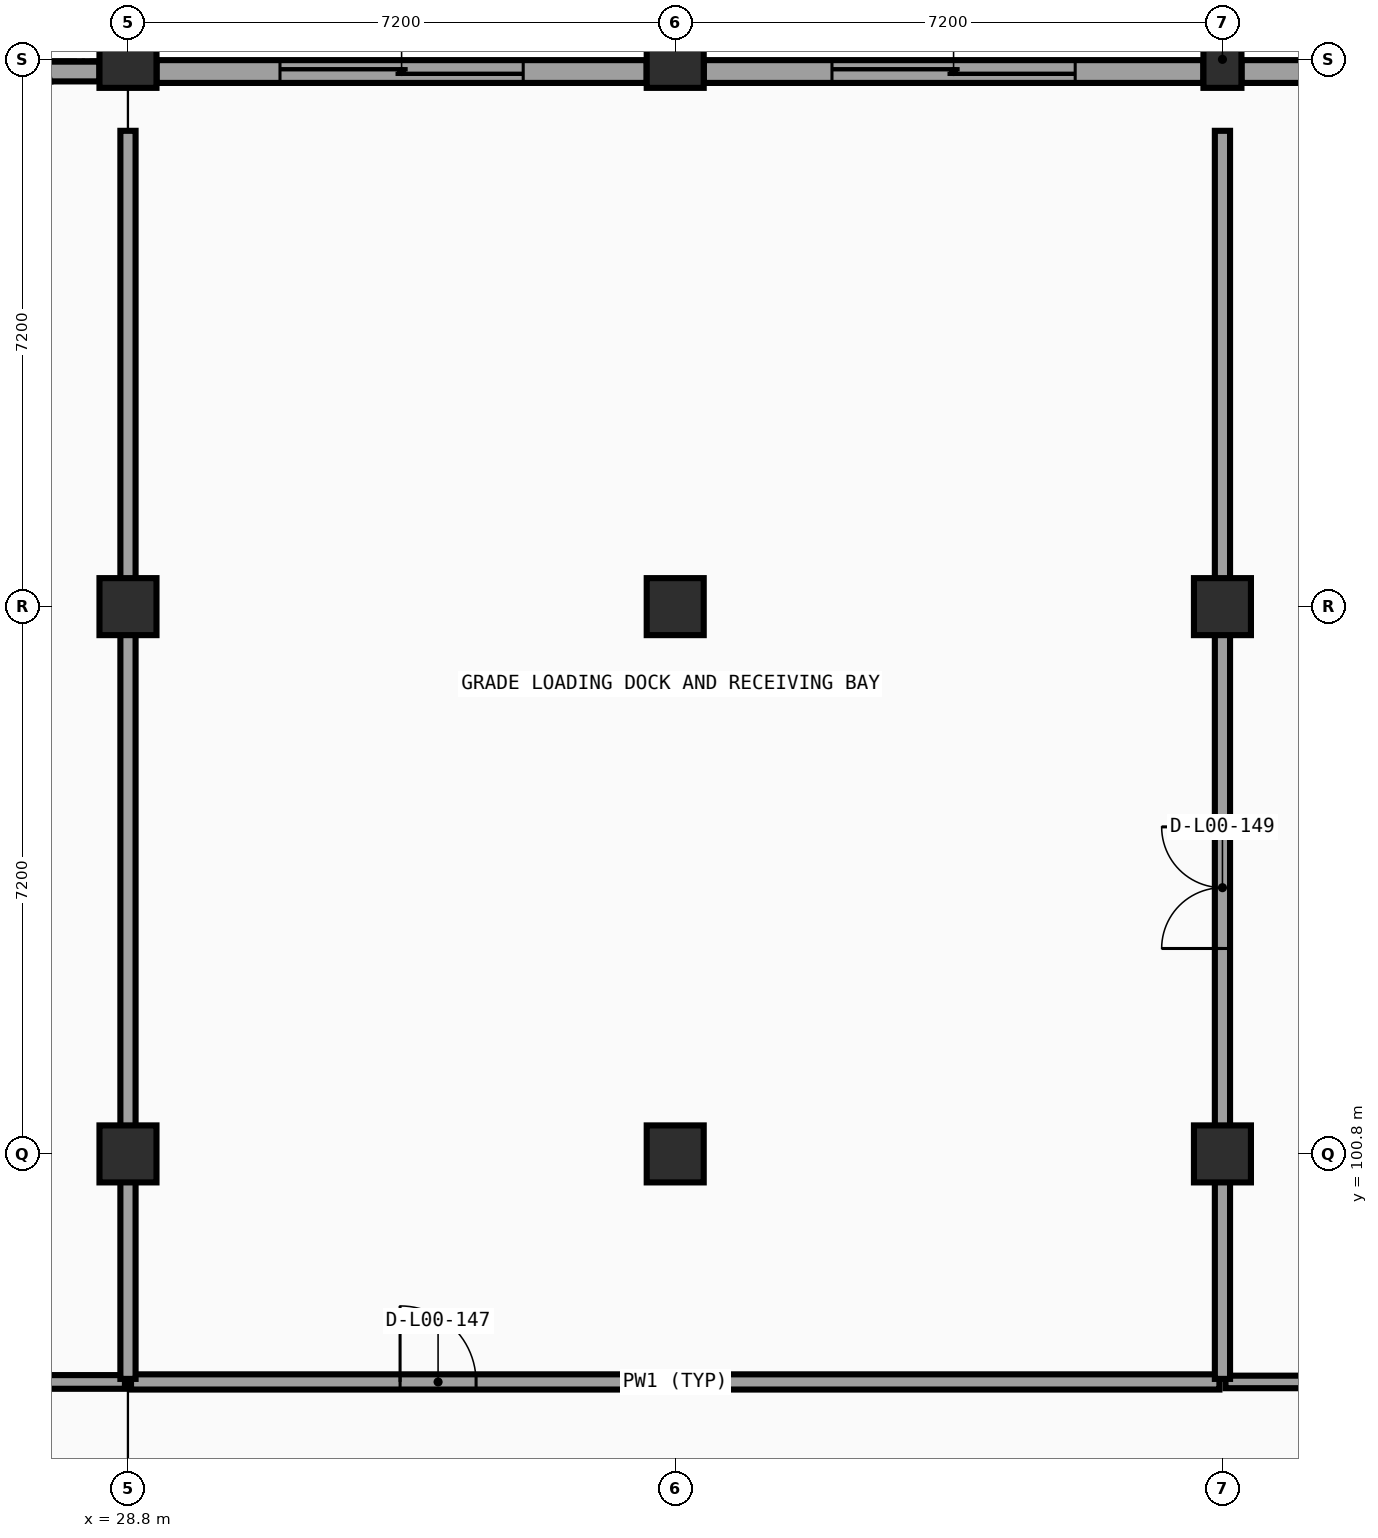
"""IFC4 building model, lengths in metres.
Left out: names, types, materials, properties, quantities, classifications, styles, units other than length and angle.
Written with IfcOpenShell. Run it as: python <this file> out.ifc"""

import sys

from ifc_helpers import new_model, si_unit, direction, frame, frame_2d, origin, origin_2d, place, context, subcontext, project, spatial, rectangle, extrude, element, fill, save


model = new_model("IFC4")
c1 = context("Model", 3, precision=1e-05, world=origin(), true_north=direction((0.0, 1.0)))
c2 = subcontext(c1, "Body", "Model", "MODEL_VIEW")
j1 = project(units=[si_unit("LENGTHUNIT", "METRE"), si_unit("PLANEANGLEUNIT", "RADIAN")], contexts=[c1])
p1 = place(None, origin())
s1 = spatial("IfcSite", under=j1, at=p1, CompositionType="ELEMENT")
p2 = place(p1, origin())
s2 = spatial("IfcBuilding", under=s1, at=p2, CompositionType="ELEMENT")
p3 = place(p2, origin())
s3 = spatial("IfcBuildingStorey", under=s2, at=p3, CompositionType="ELEMENT", Elevation=0.0)
for number, where, z_axis, x_axis in (
    (1, (28.8, 100.8, 0.0), (0.0, 0.0, 1.0), (1.0, 0.0, 0.0)),
    (2, (28.8, 108.0, 0.0), (0.0, 0.0, 1.0), (1.0, 0.0, 0.0)),
    (3, (28.8, 115.2, 0.0), (0.0, 0.0, 1.0), (1.0, 0.0, 0.0)),
    (4, (36.0, 100.8, 0.0), (0.0, 0.0, 1.0), (1.0, 0.0, 0.0)),
    (5, (36.0, 108.0, 0.0), (0.0, 0.0, 1.0), (1.0, 0.0, 0.0)),
    (6, (36.0, 115.2, 0.0), (0.0, 0.0, 1.0), (1.0, 0.0, 0.0)),
    (7, (43.2, 100.8, 0.0), (0.0, 0.0, 1.0), (1.0, 0.0, 0.0)),
    (8, (43.2, 108.0, 0.0), (0.0, 0.0, 1.0), (1.0, 0.0, 0.0)),
):
    element("IfcColumn", number, at=place(p3, frame(where, z_axis=z_axis, x_axis=x_axis)), inside=s3, PredefinedType="COLUMN", context=c2, shape_type="SweptSolid", body=[
        extrude(rectangle(XDim=0.75, YDim=0.75, at=origin_2d()), origin(), (0.0, 0.0, 1.0), 5.4),
    ])
p4 = place(p3, frame((43.2, 115.2, 0.0), z_axis=(0.0, 0.0, 1.0), x_axis=(1.0, 0.0, 0.0)))
e9 = element("IfcColumn", 9, at=p4, inside=s3, PredefinedType="PILASTER", context=c2, shape_type="SweptSolid", body=[
    extrude(rectangle(XDim=0.5, YDim=0.75, at=origin_2d()), origin(), (0.0, 0.0, 1.0), 5.4),
])
p5 = place(p3, frame((27.744, 115.04, 0.0), z_axis=(0.0, 0.0, 1.0), x_axis=(1.0, 0.0, 0.0)))
e10 = element("IfcWall", 10, at=p5, inside=s3, PredefinedType="SOLIDWALL", context=c2, shape_type="SweptSolid", body=[
    extrude(rectangle(XDim=0.68, YDim=0.26, at=frame_2d((0.34, 0.0))), origin(), (0.0, 0.0, 1.0), 4.411),
])
p6 = place(p3, frame((29.176, 115.04, 0.0), z_axis=(0.0, 0.0, 1.0), x_axis=(1.0, 0.0, 0.0)))
e11 = element("IfcWall", 11, at=p6, inside=s3, PredefinedType="SOLIDWALL", context=c2, shape_type="SweptSolid", body=[
    extrude(rectangle(XDim=6.448, YDim=0.3, at=frame_2d((3.224, 0.0))), origin(), (0.0, 0.0, 1.0), 4.411),
])
p7 = place(p6, frame((1.624, 0.0, 0.0)))
e12 = element("IfcOpeningElement", 12, at=p7, cuts=e11, PredefinedType="OPENING", context=c2, shape_type="SweptSolid", body=[
    extrude(rectangle(XDim=3.2, YDim=3.5, at=frame_2d((1.6, 1.75))), frame((0.0, 0.16, 0.0), z_axis=(0.0, -1.0, 0.0), x_axis=(1.0, 0.0, 0.0)), (0.0, 0.0, 1.0), 0.32),
])
p8 = place(p3, frame((36.376, 115.04, 0.0), z_axis=(0.0, 0.0, 1.0), x_axis=(1.0, 0.0, 0.0)))
e13 = element("IfcWall", 13, at=p8, inside=s3, PredefinedType="SOLIDWALL", context=c2, shape_type="SweptSolid", body=[
    extrude(rectangle(XDim=6.573, YDim=0.3, at=frame_2d((3.287, 0.0))), origin(), (0.0, 0.0, 1.0), 4.311),
])
p9 = place(p8, frame((1.687, 0.0, 0.0)))
e14 = element("IfcOpeningElement", 14, at=p9, cuts=e13, PredefinedType="OPENING", context=c2, shape_type="SweptSolid", body=[
    extrude(rectangle(XDim=3.2, YDim=3.5, at=frame_2d((1.6, 1.75))), frame((0.0, 0.16, 0.0), z_axis=(0.0, -1.0, 0.0), x_axis=(1.0, 0.0, 0.0)), (0.0, 0.0, 1.0), 0.32),
])
p10 = place(p3, frame((43.451, 115.04, 0.0), z_axis=(0.0, 0.0, 1.0), x_axis=(1.0, 0.0, 0.0)))
e15 = element("IfcWall", 15, at=p10, inside=s3, PredefinedType="SOLIDWALL", context=c2, shape_type="SweptSolid", body=[
    extrude(rectangle(XDim=6.573, YDim=0.3, at=frame_2d((3.287, 0.0))), origin(), (0.0, 0.0, 1.0), 4.311),
])
p11 = place(p10, frame((2.362, 0.0, 0.85)))
e16 = element("IfcOpeningElement", 16, at=p11, cuts=e15, PredefinedType="OPENING", context=c2, shape_type="SweptSolid", body=[
    extrude(rectangle(XDim=1.85, YDim=2.1, at=frame_2d((0.925, 1.05))), frame((0.0, 0.16, 0.0), z_axis=(0.0, -1.0, 0.0), x_axis=(1.0, 0.0, 0.0)), (0.0, 0.0, 1.0), 0.32),
])
p12 = place(p3, frame((4.64, 97.8, 0.0), z_axis=(0.0, 0.0, 1.0), x_axis=(1.0, 0.0, 0.0)))
e17 = element("IfcWall", 17, at=p12, inside=s3, PredefinedType="PARTITIONING", context=c2, shape_type="SweptSolid", body=[
    extrude(rectangle(XDim=24.12, YDim=0.18, at=frame_2d((12.06, 0.0))), origin(), (0.0, 0.0, 1.0), 4.311),
])
p13 = place(p12, frame((19.915, 0.0, 0.0)))
e18 = element("IfcOpeningElement", 18, at=p13, cuts=e17, PredefinedType="OPENING", context=c2, shape_type="SweptSolid", body=[
    extrude(rectangle(XDim=1.0, YDim=2.1, at=frame_2d((0.5, 1.05))), frame((0.0, 0.1, 0.0), z_axis=(0.0, -1.0, 0.0), x_axis=(1.0, 0.0, 0.0)), (0.0, 0.0, 1.0), 0.2),
])
p14 = place(p3, frame((28.84, 97.8, 0.0), z_axis=(0.0, 0.0, 1.0), x_axis=(1.0, 0.0, 0.0)))
e19 = element("IfcWall", 19, at=p14, inside=s3, PredefinedType="PARTITIONING", context=c2, shape_type="SweptSolid", body=[
    extrude(rectangle(XDim=14.32, YDim=0.2, at=frame_2d((7.16, 0.0))), origin(), (0.0, 0.0, 1.0), 4.311),
])
p15 = place(p14, frame((3.54, 0.0, 0.0)))
e20 = element("IfcOpeningElement", 20, at=p15, cuts=e19, PredefinedType="OPENING", context=c2, shape_type="SweptSolid", body=[
    extrude(rectangle(XDim=1.0, YDim=2.1, at=frame_2d((0.5, 1.05))), frame((0.0, 0.11, 0.0), z_axis=(0.0, -1.0, 0.0), x_axis=(1.0, 0.0, 0.0)), (0.0, 0.0, 1.0), 0.22),
])
p16 = place(p3, frame((43.24, 97.8, 0.0), z_axis=(0.0, 0.0, 1.0), x_axis=(1.0, 0.0, 0.0)))
e21 = element("IfcWall", 21, at=p16, inside=s3, PredefinedType="PARTITIONING", context=c2, shape_type="SweptSolid", body=[
    extrude(rectangle(XDim=21.12, YDim=0.165, at=frame_2d((10.56, 0.0))), origin(), (0.0, 0.0, 1.0), 4.311),
])
p17 = place(p16, frame((2.755, 0.0, 0.0)))
e22 = element("IfcOpeningElement", 22, at=p17, cuts=e21, PredefinedType="OPENING", context=c2, shape_type="SweptSolid", body=[
    extrude(rectangle(XDim=1.6, YDim=2.1, at=frame_2d((0.8, 1.05))), frame((0.0, 0.093, 0.0), z_axis=(0.0, -1.0, 0.0), x_axis=(1.0, 0.0, 0.0)), (0.0, 0.0, 1.0), 0.185),
])
p18 = place(p3, frame((28.8, 97.84, 0.0), z_axis=(0.0, 0.0, 1.0), x_axis=(0.0, 1.0, 0.0)))
e23 = element("IfcWall", 23, at=p18, inside=s3, PredefinedType="PARTITIONING", context=c2, shape_type="SweptSolid", body=[
    extrude(rectangle(XDim=16.42, YDim=0.2, at=frame_2d((8.21, 0.0))), origin(), (0.0, 0.0, 1.0), 4.311),
])
p19 = place(p3, frame((43.2, 97.84, 0.0), z_axis=(0.0, 0.0, 1.0), x_axis=(0.0, 1.0, 0.0)))
e24 = element("IfcWall", 24, at=p19, inside=s3, PredefinedType="PARTITIONING", context=c2, shape_type="SweptSolid", body=[
    extrude(rectangle(XDim=16.42, YDim=0.2, at=frame_2d((8.21, 0.0))), origin(), (0.0, 0.0, 1.0), 4.311),
])
p20 = place(p19, frame((5.663, 0.0, 0.0)))
e25 = element("IfcOpeningElement", 25, at=p20, cuts=e24, PredefinedType="OPENING", context=c2, shape_type="SweptSolid", body=[
    extrude(rectangle(XDim=1.6, YDim=2.1, at=frame_2d((0.8, 1.05))), frame((0.0, 0.11, 0.0), z_axis=(0.0, -1.0, 0.0), x_axis=(1.0, 0.0, 0.0)), (0.0, 0.0, 1.0), 0.22),
])
p21 = place(p7, origin())
e26 = element("IfcDoor", 26, at=p21, inside=s3, OperationType="ROLLINGUP", PredefinedType="DOOR", context=c2, shape_type="SweptSolid", body=[
    extrude(rectangle(XDim=3.2, YDim=3.5, at=frame_2d((1.6, 1.75))), frame((0.0, 0.025, 0.0), z_axis=(0.0, -1.0, 0.0), x_axis=(1.0, 0.0, 0.0)), (0.0, 0.0, 1.0), 0.05),
])
fill(e12, e26)
p22 = place(p9, origin())
e27 = element("IfcDoor", 27, at=p22, inside=s3, OperationType="ROLLINGUP", PredefinedType="DOOR", context=c2, shape_type="SweptSolid", body=[
    extrude(rectangle(XDim=3.2, YDim=3.5, at=frame_2d((1.6, 1.75))), frame((0.0, 0.025, 0.0), z_axis=(0.0, -1.0, 0.0), x_axis=(1.0, 0.0, 0.0)), (0.0, 0.0, 1.0), 0.05),
])
fill(e14, e27)
p23 = place(p15, origin())
e28 = element("IfcDoor", 28, at=p23, inside=s3, OperationType="SINGLE_SWING_LEFT", PredefinedType="DOOR", context=c2, shape_type="SweptSolid", body=[
    extrude(rectangle(XDim=1.0, YDim=2.1, at=frame_2d((0.5, 1.05))), frame((0.0, 0.025, 0.0), z_axis=(0.0, -1.0, 0.0), x_axis=(1.0, 0.0, 0.0)), (0.0, 0.0, 1.0), 0.05),
])
fill(e20, e28)
p24 = place(p20, origin())
e29 = element("IfcDoor", 29, at=p24, inside=s3, OperationType="DOUBLE_DOOR_SINGLE_SWING", PredefinedType="DOOR", context=c2, shape_type="SweptSolid", body=[
    extrude(rectangle(XDim=1.6, YDim=2.1, at=frame_2d((0.8, 1.05))), frame((0.0, 0.025, 0.0), z_axis=(0.0, -1.0, 0.0), x_axis=(1.0, 0.0, 0.0)), (0.0, 0.0, 1.0), 0.05),
])
fill(e25, e29)
save(model, sys.argv[1])
